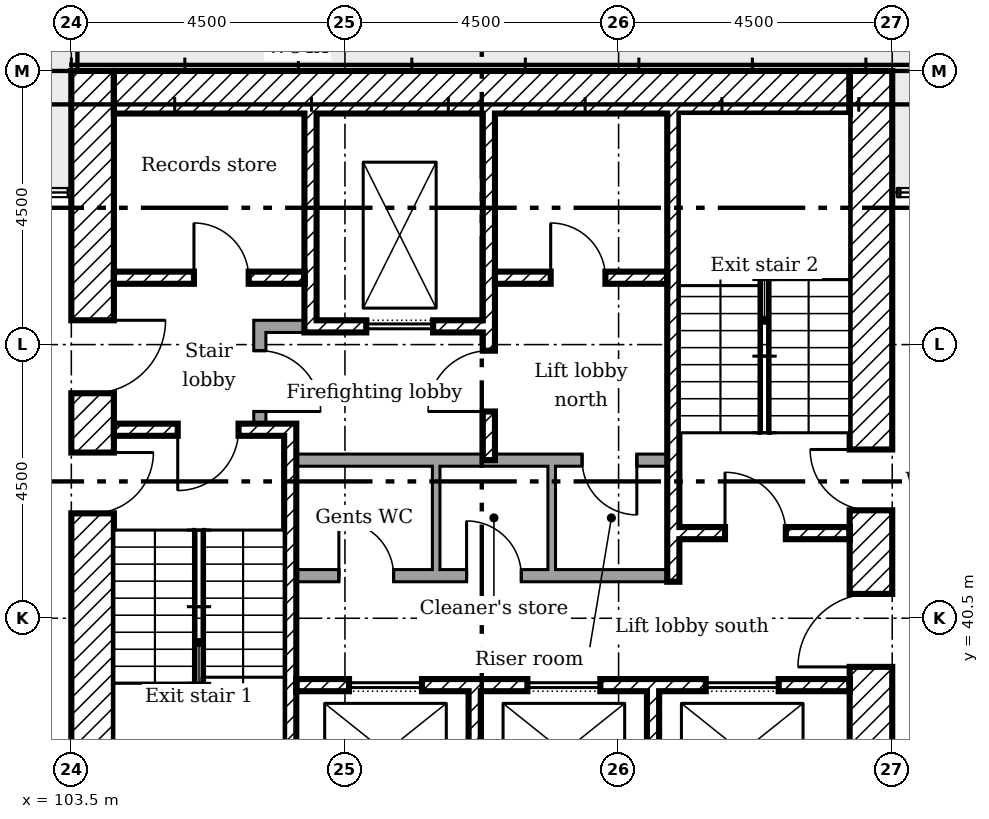
"""IFC4 building model, lengths in metres.
Left out: names, types, materials, properties, quantities, classifications, styles, units other than length and angle.
Written with IfcOpenShell. Run it as: python <this file> out.ifc"""

import sys

from ifc_helpers import new_model, si_unit, direction, frame, frame_2d, origin, place, context, subcontext, project, spatial, rectangle, extrude, element, fill, save


model = new_model("IFC4")
c1 = context("Model", 3, precision=1e-05, world=origin(), true_north=direction((0.0, 1.0)))
c2 = subcontext(c1, "Body", "Model", "MODEL_VIEW")
j1 = project(units=[si_unit("LENGTHUNIT", "METRE"), si_unit("PLANEANGLEUNIT", "RADIAN")], contexts=[c1])
p1 = place(None, origin())
s1 = spatial("IfcSite", under=j1, at=p1, CompositionType="ELEMENT")
p2 = place(p1, origin())
s2 = spatial("IfcBuilding", under=s1, at=p2, CompositionType="ELEMENT")
p3 = place(p2, frame((0.0, 0.0, 92.0)))
s3 = spatial("IfcBuildingStorey", under=s2, at=p3, CompositionType="ELEMENT", Elevation=92.0)
p4 = place(p3, frame((116.65, 36.0, 0.0), z_axis=(0.0, 0.0, 1.0), x_axis=(0.0, 1.0, 0.0)))
e1 = element("IfcWall", 1, at=p4, inside=s3, PredefinedType="SHEAR", context=c2, shape_type="SweptSolid", body=[
    extrude(rectangle(XDim=13.5, YDim=0.7, at=frame_2d((6.75, 0.0))), origin(), (0.0, 0.0, 1.0), 3.35),
])
p5 = place(p4, frame((3.7, 0.0, 0.0)))
e2 = element("IfcOpeningElement", 2, at=p5, cuts=e1, PredefinedType="OPENING", context=c2, shape_type="SweptSolid", body=[
    extrude(rectangle(XDim=1.2, YDim=2.1, at=frame_2d((0.6, 1.05))), frame((0.0, 0.36, 0.0), z_axis=(0.0, -1.0, 0.0), x_axis=(1.0, 0.0, 0.0)), (0.0, 0.0, 1.0), 0.72),
])
p6 = place(p4, frame((6.275, 0.0, 0.0)))
e3 = element("IfcOpeningElement", 3, at=p6, cuts=e1, PredefinedType="OPENING", context=c2, shape_type="SweptSolid", body=[
    extrude(rectangle(XDim=1.0, YDim=2.1, at=frame_2d((0.5, 1.05))), frame((0.0, 0.36, 0.0), z_axis=(0.0, -1.0, 0.0), x_axis=(1.0, 0.0, 0.0)), (0.0, 0.0, 1.0), 0.72),
])
p7 = place(p3, frame((104.2, 49.15, 0.0)))
e4 = element("IfcWall", 4, at=p7, inside=s3, PredefinedType="SHEAR", context=c2, shape_type="SweptSolid", body=[
    extrude(rectangle(XDim=12.1, YDim=0.7, at=frame_2d((6.05, 0.0))), origin(), (0.0, 0.0, 1.0), 3.35),
])
p8 = place(p3, frame((103.85, 36.0, 0.0), z_axis=(0.0, 0.0, 1.0), x_axis=(0.0, 1.0, 0.0)))
e5 = element("IfcWall", 5, at=p8, inside=s3, PredefinedType="SHEAR", context=c2, shape_type="SweptSolid", body=[
    extrude(rectangle(XDim=13.5, YDim=0.7, at=frame_2d((6.75, 0.0))), origin(), (0.0, 0.0, 1.0), 3.35),
])
p9 = place(p8, frame((8.2, 0.0, 0.0)))
e6 = element("IfcOpeningElement", 6, at=p9, cuts=e5, PredefinedType="OPENING", context=c2, shape_type="SweptSolid", body=[
    extrude(rectangle(XDim=1.2, YDim=2.1, at=frame_2d((0.6, 1.05))), frame((0.0, 0.36, 0.0), z_axis=(0.0, -1.0, 0.0), x_axis=(1.0, 0.0, 0.0)), (0.0, 0.0, 1.0), 0.72),
])
p10 = place(p8, frame((6.225, 0.0, 0.0)))
e7 = element("IfcOpeningElement", 7, at=p10, cuts=e5, PredefinedType="OPENING", context=c2, shape_type="SweptSolid", body=[
    extrude(rectangle(XDim=1.0, YDim=2.1, at=frame_2d((0.5, 1.05))), frame((0.0, 0.36, 0.0), z_axis=(0.0, -1.0, 0.0), x_axis=(1.0, 0.0, 0.0)), (0.0, 0.0, 1.0), 0.72),
])
p11 = place(p3, frame((107.433, 48.8, 0.0), z_axis=(0.0, 0.0, 1.0), x_axis=(0.0, -1.0, 0.0)))
e8 = element("IfcWall", 8, at=p11, inside=s3, PredefinedType="SHEAR", context=c2, shape_type="SweptSolid", body=[
    extrude(rectangle(XDim=3.6, YDim=0.2, at=frame_2d((1.8, 0.0))), origin(), (0.0, 0.0, 1.0), 3.35),
])
p12 = place(p3, frame((110.367, 48.8, 0.0), z_axis=(0.0, 0.0, 1.0), x_axis=(0.0, -1.0, 0.0)))
e9 = element("IfcWall", 9, at=p12, inside=s3, PredefinedType="SHEAR", context=c2, shape_type="SweptSolid", body=[
    extrude(rectangle(XDim=5.7, YDim=0.2, at=frame_2d((2.85, 0.0))), origin(), (0.0, 0.0, 1.0), 3.35),
])
p13 = place(p12, frame((3.9, 0.0, 0.0)))
e10 = element("IfcOpeningElement", 10, at=p13, cuts=e9, PredefinedType="OPENING", context=c2, shape_type="SweptSolid", body=[
    extrude(rectangle(XDim=1.0, YDim=2.1, at=frame_2d((0.5, 1.05))), frame((0.0, 0.11, 0.0), z_axis=(0.0, -1.0, 0.0), x_axis=(1.0, 0.0, 0.0)), (0.0, 0.0, 1.0), 0.22),
])
for number, where, z_axis, x_axis in (
    (11, (110.133, 36.7, 0.0), (0.0, 0.0, 1.0), (0.0, 1.0, 0.0)),
    (12, (113.067, 36.7, 0.0), (0.0, 0.0, 1.0), (0.0, 1.0, 0.0)),
):
    element("IfcWall", number, at=place(p3, frame(where, z_axis=z_axis, x_axis=x_axis)), inside=s3, PredefinedType="SHEAR", context=c2, shape_type="SweptSolid", body=[
        extrude(rectangle(XDim=2.6, YDim=0.2, at=frame_2d((1.3, 0.0))), origin(), (0.0, 0.0, 1.0), 3.35),
    ])
p14 = place(p3, frame((106.5, 45.3, 0.0)))
e13 = element("IfcWall", 13, at=p14, inside=s3, PredefinedType="PARTITIONING", context=c2, shape_type="SweptSolid", body=[
    extrude(rectangle(XDim=0.833, YDim=0.2, at=frame_2d((0.417, 0.0))), origin(), (0.0, 0.0, 1.0), 3.35),
])
p15 = place(p3, frame((106.6, 43.7, 0.0), z_axis=(0.0, 0.0, 1.0), x_axis=(0.0, 1.0, 0.0)))
e14 = element("IfcWall", 14, at=p15, inside=s3, PredefinedType="PARTITIONING", context=c2, shape_type="SweptSolid", body=[
    extrude(rectangle(XDim=1.5, YDim=0.2, at=frame_2d((0.75, 0.0))), origin(), (0.0, 0.0, 1.0), 3.35),
])
p16 = place(p15, frame((0.2, 0.0, 0.0)))
e15 = element("IfcOpeningElement", 15, at=p16, cuts=e14, PredefinedType="OPENING", context=c2, shape_type="SweptSolid", body=[
    extrude(rectangle(XDim=1.0, YDim=2.1, at=frame_2d((0.5, 1.05))), frame((0.0, 0.11, 0.0), z_axis=(0.0, -1.0, 0.0), x_axis=(1.0, 0.0, 0.0)), (0.0, 0.0, 1.0), 0.22),
])
p17 = place(p3, frame((104.2, 46.1, 0.0)))
e16 = element("IfcWall", 16, at=p17, inside=s3, PredefinedType="SHEAR", context=c2, shape_type="SweptSolid", body=[
    extrude(rectangle(XDim=3.133, YDim=0.2, at=frame_2d((1.567, 0.0))), origin(), (0.0, 0.0, 1.0), 3.35),
])
p18 = place(p17, frame((1.317, 0.0, 0.0)))
e17 = element("IfcOpeningElement", 17, at=p18, cuts=e16, PredefinedType="OPENING", context=c2, shape_type="SweptSolid", body=[
    extrude(rectangle(XDim=0.9, YDim=2.1, at=frame_2d((0.45, 1.05))), frame((0.0, 0.11, 0.0), z_axis=(0.0, -1.0, 0.0), x_axis=(1.0, 0.0, 0.0)), (0.0, 0.0, 1.0), 0.22),
])
p19 = place(p3, frame((110.467, 46.1, 0.0)))
e18 = element("IfcWall", 18, at=p19, inside=s3, PredefinedType="SHEAR", context=c2, shape_type="SweptSolid", body=[
    extrude(rectangle(XDim=2.833, YDim=0.2, at=frame_2d((1.417, 0.0))), origin(), (0.0, 0.0, 1.0), 3.35),
])
p20 = place(p19, frame((0.917, 0.0, 0.0)))
e19 = element("IfcOpeningElement", 19, at=p20, cuts=e18, PredefinedType="OPENING", context=c2, shape_type="SweptSolid", body=[
    extrude(rectangle(XDim=0.9, YDim=2.1, at=frame_2d((0.45, 1.05))), frame((0.0, 0.11, 0.0), z_axis=(0.0, -1.0, 0.0), x_axis=(1.0, 0.0, 0.0)), (0.0, 0.0, 1.0), 0.22),
])
p21 = place(p3, frame((107.533, 45.3, 0.0)))
e20 = element("IfcWall", 20, at=p21, inside=s3, PredefinedType="SHEAR", context=c2, shape_type="SweptSolid", body=[
    extrude(rectangle(XDim=2.733, YDim=0.2, at=frame_2d((1.367, 0.0))), origin(), (0.0, 0.0, 1.0), 3.35),
])
p22 = place(p21, frame((0.817, 0.0, 0.0)))
e21 = element("IfcOpeningElement", 21, at=p22, cuts=e20, PredefinedType="OPENING", context=c2, shape_type="SweptSolid", body=[
    extrude(rectangle(XDim=1.1, YDim=2.1, at=frame_2d((0.55, 1.05))), frame((0.0, 0.11, 0.0), z_axis=(0.0, -1.0, 0.0), x_axis=(1.0, 0.0, 0.0)), (0.0, 0.0, 1.0), 0.22),
])
p23 = place(p3, frame((107.2, 39.4, 0.0)))
e22 = element("IfcWall", 22, at=p23, inside=s3, PredefinedType="SHEAR", context=c2, shape_type="SweptSolid", body=[
    extrude(rectangle(XDim=9.1, YDim=0.2, at=frame_2d((4.55, 0.0))), origin(), (0.0, 0.0, 1.0), 3.35),
])
p24 = place(p23, frame((0.867, 0.0, 0.0)))
e23 = element("IfcOpeningElement", 23, at=p24, cuts=e22, PredefinedType="OPENING", context=c2, shape_type="SweptSolid", body=[
    extrude(rectangle(XDim=1.2, YDim=2.1, at=frame_2d((0.6, 1.05))), frame((0.0, 0.11, 0.0), z_axis=(0.0, -1.0, 0.0), x_axis=(1.0, 0.0, 0.0)), (0.0, 0.0, 1.0), 0.22),
])
p25 = place(p23, frame((3.8, 0.0, 0.0)))
e24 = element("IfcOpeningElement", 24, at=p25, cuts=e22, PredefinedType="OPENING", context=c2, shape_type="SweptSolid", body=[
    extrude(rectangle(XDim=1.2, YDim=2.1, at=frame_2d((0.6, 1.05))), frame((0.0, 0.11, 0.0), z_axis=(0.0, -1.0, 0.0), x_axis=(1.0, 0.0, 0.0)), (0.0, 0.0, 1.0), 0.22),
])
p26 = place(p23, frame((6.733, 0.0, 0.0)))
e25 = element("IfcOpeningElement", 25, at=p26, cuts=e22, PredefinedType="OPENING", context=c2, shape_type="SweptSolid", body=[
    extrude(rectangle(XDim=1.2, YDim=2.1, at=frame_2d((0.6, 1.05))), frame((0.0, 0.11, 0.0), z_axis=(0.0, -1.0, 0.0), x_axis=(1.0, 0.0, 0.0)), (0.0, 0.0, 1.0), 0.22),
])
p27 = place(p3, frame((107.1, 36.7, 0.0), z_axis=(0.0, 0.0, 1.0), x_axis=(0.0, 1.0, 0.0)))
e26 = element("IfcWall", 26, at=p27, inside=s3, PredefinedType="SHEAR", context=c2, shape_type="SweptSolid", body=[
    extrude(rectangle(XDim=7.0, YDim=0.2, at=frame_2d((3.5, 0.0))), origin(), (0.0, 0.0, 1.0), 3.35),
])
p28 = place(p3, frame((104.2, 43.6, 0.0)))
e27 = element("IfcWall", 27, at=p28, inside=s3, PredefinedType="SHEAR", context=c2, shape_type="SweptSolid", body=[
    extrude(rectangle(XDim=2.8, YDim=0.2, at=frame_2d((1.4, 0.0))), origin(), (0.0, 0.0, 1.0), 3.35),
])
p29 = place(p28, frame((1.05, 0.0, 0.0)))
e28 = element("IfcOpeningElement", 28, at=p29, cuts=e27, PredefinedType="OPENING", context=c2, shape_type="SweptSolid", body=[
    extrude(rectangle(XDim=1.0, YDim=2.1, at=frame_2d((0.5, 1.05))), frame((0.0, 0.11, 0.0), z_axis=(0.0, -1.0, 0.0), x_axis=(1.0, 0.0, 0.0)), (0.0, 0.0, 1.0), 0.22),
])
p30 = place(p3, frame((113.5, 41.9, 0.0)))
e29 = element("IfcWall", 29, at=p30, inside=s3, PredefinedType="SHEAR", context=c2, shape_type="SweptSolid", body=[
    extrude(rectangle(XDim=2.8, YDim=0.2, at=frame_2d((1.4, 0.0))), origin(), (0.0, 0.0, 1.0), 3.35),
])
p31 = place(p30, frame((0.75, 0.0, 0.0)))
e30 = element("IfcOpeningElement", 30, at=p31, cuts=e29, PredefinedType="OPENING", context=c2, shape_type="SweptSolid", body=[
    extrude(rectangle(XDim=1.0, YDim=2.1, at=frame_2d((0.5, 1.05))), frame((0.0, 0.11, 0.0), z_axis=(0.0, -1.0, 0.0), x_axis=(1.0, 0.0, 0.0)), (0.0, 0.0, 1.0), 0.22),
])
p32 = place(p3, frame((113.4, 41.1, 0.0), z_axis=(0.0, 0.0, 1.0), x_axis=(0.0, 1.0, 0.0)))
e31 = element("IfcWall", 31, at=p32, inside=s3, PredefinedType="SHEAR", context=c2, shape_type="SweptSolid", body=[
    extrude(rectangle(XDim=7.7, YDim=0.2, at=frame_2d((3.85, 0.0))), origin(), (0.0, 0.0, 1.0), 3.35),
])
p33 = place(p3, frame((107.2, 43.1, 0.0)))
e32 = element("IfcWall", 32, at=p33, inside=s3, PredefinedType="PARTITIONING", context=c2, shape_type="SweptSolid", body=[
    extrude(rectangle(XDim=6.1, YDim=0.2, at=frame_2d((3.05, 0.0))), origin(), (0.0, 0.0, 1.0), 3.35),
])
p34 = place(p33, frame((4.7, 0.0, 0.0)))
e33 = element("IfcOpeningElement", 33, at=p34, cuts=e32, PredefinedType="OPENING", context=c2, shape_type="SweptSolid", body=[
    extrude(rectangle(XDim=0.9, YDim=2.1, at=frame_2d((0.45, 1.05))), frame((0.0, 0.11, 0.0), z_axis=(0.0, -1.0, 0.0), x_axis=(1.0, 0.0, 0.0)), (0.0, 0.0, 1.0), 0.22),
])
p35 = place(p3, frame((107.2, 41.2, 0.0)))
e34 = element("IfcWall", 34, at=p35, inside=s3, PredefinedType="PARTITIONING", context=c2, shape_type="SweptSolid", body=[
    extrude(rectangle(XDim=6.1, YDim=0.2, at=frame_2d((3.05, 0.0))), origin(), (0.0, 0.0, 1.0), 3.35),
])
p36 = place(p35, frame((0.7, 0.0, 0.0)))
e35 = element("IfcOpeningElement", 35, at=p36, cuts=e34, PredefinedType="OPENING", context=c2, shape_type="SweptSolid", body=[
    extrude(rectangle(XDim=0.9, YDim=2.1, at=frame_2d((0.45, 1.05))), frame((0.0, 0.11, 0.0), z_axis=(0.0, -1.0, 0.0), x_axis=(1.0, 0.0, 0.0)), (0.0, 0.0, 1.0), 0.22),
])
p37 = place(p35, frame((2.8, 0.0, 0.0)))
e36 = element("IfcOpeningElement", 36, at=p37, cuts=e34, PredefinedType="OPENING", context=c2, shape_type="SweptSolid", body=[
    extrude(rectangle(XDim=0.9, YDim=2.1, at=frame_2d((0.45, 1.05))), frame((0.0, 0.11, 0.0), z_axis=(0.0, -1.0, 0.0), x_axis=(1.0, 0.0, 0.0)), (0.0, 0.0, 1.0), 0.22),
])
for number, where, z_axis, x_axis in (
    (37, (109.5, 41.3, 0.0), (0.0, 0.0, 1.0), (0.0, 1.0, 0.0)),
    (38, (111.4, 41.3, 0.0), (0.0, 0.0, 1.0), (0.0, 1.0, 0.0)),
):
    element("IfcWall", number, at=place(p3, frame(where, z_axis=z_axis, x_axis=x_axis)), inside=s3, PredefinedType="PARTITIONING", context=c2, shape_type="SweptSolid", body=[
        extrude(rectangle(XDim=1.7, YDim=0.125, at=frame_2d((0.85, 0.0))), origin(), (0.0, 0.0, 1.0), 3.35),
    ])
p38 = place(p9, frame((1.2, 0.0, 0.0), x_axis=(-1.0, 0.0, 0.0)))
e39 = element("IfcDoor", 39, at=p38, inside=s3, OperationType="SINGLE_SWING_RIGHT", PredefinedType="DOOR", context=c2, shape_type="SweptSolid", body=[
    extrude(rectangle(XDim=1.2, YDim=2.1, at=frame_2d((0.6, 1.05))), frame((0.0, 0.025, 0.0), z_axis=(0.0, -1.0, 0.0), x_axis=(1.0, 0.0, 0.0)), (0.0, 0.0, 1.0), 0.05),
])
fill(e6, e39)
p39 = place(p5, origin())
e40 = element("IfcDoor", 40, at=p39, inside=s3, OperationType="SINGLE_SWING_RIGHT", PredefinedType="DOOR", context=c2, shape_type="SweptSolid", body=[
    extrude(rectangle(XDim=1.2, YDim=2.1, at=frame_2d((0.6, 1.05))), frame((0.0, 0.025, 0.0), z_axis=(0.0, -1.0, 0.0), x_axis=(1.0, 0.0, 0.0)), (0.0, 0.0, 1.0), 0.05),
])
fill(e2, e40)
p40 = place(p29, frame((1.0, 0.0, 0.0), x_axis=(-1.0, 0.0, 0.0)))
e41 = element("IfcDoor", 41, at=p40, inside=s3, OperationType="SINGLE_SWING_LEFT", PredefinedType="DOOR", context=c2, shape_type="SweptSolid", body=[
    extrude(rectangle(XDim=1.0, YDim=2.1, at=frame_2d((0.5, 1.05))), frame((0.0, 0.025, 0.0), z_axis=(0.0, -1.0, 0.0), x_axis=(1.0, 0.0, 0.0)), (0.0, 0.0, 1.0), 0.05),
])
fill(e28, e41)
p41 = place(p10, frame((1.0, 0.0, 0.0), x_axis=(-1.0, 0.0, 0.0)))
e42 = element("IfcDoor", 42, at=p41, inside=s3, OperationType="SINGLE_SWING_RIGHT", PredefinedType="DOOR", context=c2, shape_type="SweptSolid", body=[
    extrude(rectangle(XDim=1.0, YDim=2.1, at=frame_2d((0.5, 1.05))), frame((0.0, 0.025, 0.0), z_axis=(0.0, -1.0, 0.0), x_axis=(1.0, 0.0, 0.0)), (0.0, 0.0, 1.0), 0.05),
])
fill(e7, e42)
p42 = place(p31, origin())
e43 = element("IfcDoor", 43, at=p42, inside=s3, OperationType="SINGLE_SWING_RIGHT", PredefinedType="DOOR", context=c2, shape_type="SweptSolid", body=[
    extrude(rectangle(XDim=1.0, YDim=2.1, at=frame_2d((0.5, 1.05))), frame((0.0, 0.025, 0.0), z_axis=(0.0, -1.0, 0.0), x_axis=(1.0, 0.0, 0.0)), (0.0, 0.0, 1.0), 0.05),
])
fill(e30, e43)
p43 = place(p6, origin())
e44 = element("IfcDoor", 44, at=p43, inside=s3, OperationType="SINGLE_SWING_LEFT", PredefinedType="DOOR", context=c2, shape_type="SweptSolid", body=[
    extrude(rectangle(XDim=1.0, YDim=2.1, at=frame_2d((0.5, 1.05))), frame((0.0, 0.025, 0.0), z_axis=(0.0, -1.0, 0.0), x_axis=(1.0, 0.0, 0.0)), (0.0, 0.0, 1.0), 0.05),
])
fill(e3, e44)
p44 = place(p13, frame((1.0, 0.0, 0.0), x_axis=(-1.0, 0.0, 0.0)))
e45 = element("IfcDoor", 45, at=p44, inside=s3, OperationType="SINGLE_SWING_RIGHT", PredefinedType="DOOR", context=c2, shape_type="SweptSolid", body=[
    extrude(rectangle(XDim=1.0, YDim=2.1, at=frame_2d((0.5, 1.05))), frame((0.0, 0.025, 0.0), z_axis=(0.0, -1.0, 0.0), x_axis=(1.0, 0.0, 0.0)), (0.0, 0.0, 1.0), 0.05),
])
fill(e10, e45)
p45 = place(p16, frame((1.0, 0.0, 0.0), x_axis=(-1.0, 0.0, 0.0)))
e46 = element("IfcDoor", 46, at=p45, inside=s3, OperationType="SINGLE_SWING_LEFT", PredefinedType="DOOR", context=c2, shape_type="SweptSolid", body=[
    extrude(rectangle(XDim=1.0, YDim=2.1, at=frame_2d((0.5, 1.05))), frame((0.0, 0.025, 0.0), z_axis=(0.0, -1.0, 0.0), x_axis=(1.0, 0.0, 0.0)), (0.0, 0.0, 1.0), 0.05),
])
fill(e15, e46)
p46 = place(p18, origin())
e47 = element("IfcDoor", 47, at=p46, inside=s3, OperationType="SINGLE_SWING_RIGHT", PredefinedType="DOOR", context=c2, shape_type="SweptSolid", body=[
    extrude(rectangle(XDim=0.9, YDim=2.1, at=frame_2d((0.45, 1.05))), frame((0.0, 0.025, 0.0), z_axis=(0.0, -1.0, 0.0), x_axis=(1.0, 0.0, 0.0)), (0.0, 0.0, 1.0), 0.05),
])
fill(e17, e47)
p47 = place(p20, origin())
e48 = element("IfcDoor", 48, at=p47, inside=s3, OperationType="SINGLE_SWING_RIGHT", PredefinedType="DOOR", context=c2, shape_type="SweptSolid", body=[
    extrude(rectangle(XDim=0.9, YDim=2.1, at=frame_2d((0.45, 1.05))), frame((0.0, 0.025, 0.0), z_axis=(0.0, -1.0, 0.0), x_axis=(1.0, 0.0, 0.0)), (0.0, 0.0, 1.0), 0.05),
])
fill(e19, e48)
p48 = place(p36, origin())
e49 = element("IfcDoor", 49, at=p48, inside=s3, OperationType="SINGLE_SWING_RIGHT", PredefinedType="DOOR", context=c2, shape_type="SweptSolid", body=[
    extrude(rectangle(XDim=0.9, YDim=2.1, at=frame_2d((0.45, 1.05))), frame((0.0, 0.025, 0.0), z_axis=(0.0, -1.0, 0.0), x_axis=(1.0, 0.0, 0.0)), (0.0, 0.0, 1.0), 0.05),
])
fill(e35, e49)
p49 = place(p37, origin())
e50 = element("IfcDoor", 50, at=p49, inside=s3, OperationType="SINGLE_SWING_RIGHT", PredefinedType="DOOR", context=c2, shape_type="SweptSolid", body=[
    extrude(rectangle(XDim=0.9, YDim=2.1, at=frame_2d((0.45, 1.05))), frame((0.0, 0.025, 0.0), z_axis=(0.0, -1.0, 0.0), x_axis=(1.0, 0.0, 0.0)), (0.0, 0.0, 1.0), 0.05),
])
fill(e36, e50)
p50 = place(p34, frame((0.9, 0.0, 0.0), x_axis=(-1.0, 0.0, 0.0)))
e51 = element("IfcDoor", 51, at=p50, inside=s3, OperationType="SINGLE_SWING_RIGHT", PredefinedType="DOOR", context=c2, shape_type="SweptSolid", body=[
    extrude(rectangle(XDim=0.9, YDim=2.1, at=frame_2d((0.45, 1.05))), frame((0.0, 0.025, 0.0), z_axis=(0.0, -1.0, 0.0), x_axis=(1.0, 0.0, 0.0)), (0.0, 0.0, 1.0), 0.05),
])
fill(e33, e51)
p51 = place(p22, origin())
e52 = element("IfcDoor", 52, at=p51, inside=s3, OperationType="SLIDING_TO_LEFT", PredefinedType="DOOR", context=c2, shape_type="SweptSolid", body=[
    extrude(rectangle(XDim=1.1, YDim=2.1, at=frame_2d((0.55, 1.05))), frame((0.0, 0.025, 0.0), z_axis=(0.0, -1.0, 0.0), x_axis=(1.0, 0.0, 0.0)), (0.0, 0.0, 1.0), 0.05),
])
fill(e21, e52)
p52 = place(p24, origin())
e53 = element("IfcDoor", 53, at=p52, inside=s3, OperationType="SLIDING_TO_LEFT", PredefinedType="DOOR", context=c2, shape_type="SweptSolid", body=[
    extrude(rectangle(XDim=1.2, YDim=2.1, at=frame_2d((0.6, 1.05))), frame((0.0, 0.025, 0.0), z_axis=(0.0, -1.0, 0.0), x_axis=(1.0, 0.0, 0.0)), (0.0, 0.0, 1.0), 0.05),
])
fill(e23, e53)
p53 = place(p25, origin())
e54 = element("IfcDoor", 54, at=p53, inside=s3, OperationType="SLIDING_TO_LEFT", PredefinedType="DOOR", context=c2, shape_type="SweptSolid", body=[
    extrude(rectangle(XDim=1.2, YDim=2.1, at=frame_2d((0.6, 1.05))), frame((0.0, 0.025, 0.0), z_axis=(0.0, -1.0, 0.0), x_axis=(1.0, 0.0, 0.0)), (0.0, 0.0, 1.0), 0.05),
])
fill(e24, e54)
p54 = place(p26, origin())
e55 = element("IfcDoor", 55, at=p54, inside=s3, OperationType="SLIDING_TO_LEFT", PredefinedType="DOOR", context=c2, shape_type="SweptSolid", body=[
    extrude(rectangle(XDim=1.2, YDim=2.1, at=frame_2d((0.6, 1.05))), frame((0.0, 0.025, 0.0), z_axis=(0.0, -1.0, 0.0), x_axis=(1.0, 0.0, 0.0)), (0.0, 0.0, 1.0), 0.05),
])
fill(e25, e55)
save(model, sys.argv[1])
